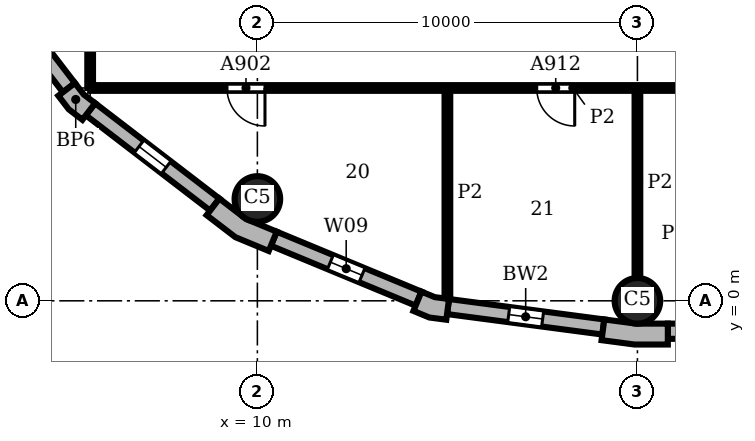
"""IFC4 building model, lengths in metres.
Left out: names, types, materials, properties, quantities, classifications, styles, units other than length and angle.
Written with IfcOpenShell. Run it as: python <this file> out.ifc"""

import sys

from ifc_helpers import new_model, si_unit, direction, frame, frame_2d, origin, origin_2d, place, context, subcontext, project, spatial, polyline, rectangle, circle, outline, extrude, element, fill, save


model = new_model("IFC4")
c1 = context("Model", 3, precision=1e-05, world=origin(), true_north=direction((0.0, 1.0)))
c2 = subcontext(c1, "Body", "Model", "MODEL_VIEW")
j1 = project(units=[si_unit("LENGTHUNIT", "METRE"), si_unit("PLANEANGLEUNIT", "RADIAN")], contexts=[c1])
p1 = place(None, origin())
s1 = spatial("IfcSite", under=j1, at=p1, CompositionType="ELEMENT")
p2 = place(p1, origin())
s2 = spatial("IfcBuilding", under=s1, at=p2, CompositionType="ELEMENT")
p3 = place(p2, frame((0.0, 0.0, 113.4)))
s3 = spatial("IfcBuildingStorey", under=s2, at=p3, CompositionType="ELEMENT", Elevation=113.4)
for number, where, z_axis, x_axis in (
    (1, (20.0, 0.0, 0.0), (0.0, 0.0, 1.0), (1.0, 0.0, 0.0)),
    (2, (10.0, 2.679, 0.0), (0.0, 0.0, 1.0), (1.0, 0.0, 0.0)),
):
    element("IfcColumn", number, at=place(p3, frame(where, z_axis=z_axis, x_axis=x_axis)), inside=s3, PredefinedType="COLUMN", context=c2, shape_type="SweptSolid", body=[
        extrude(circle(Radius=0.6, at=origin_2d()), origin(), (0.0, 0.0, 1.0), 3.9),
    ])
p4 = place(p3, origin())
e3 = element("IfcWall", 3, at=p4, inside=s3, PredefinedType="SOLIDWALL", context=c2, shape_type="SweptSolid", body=[
    extrude(outline(polyline([(19.076, -0.887), (19.057, -1.036), (19.925, -1.15), (20.8, -1.15), (20.8, -1.0), (20.8, -0.6), (19.961, -0.6), (19.128, -0.49), (19.076, -0.887)])), origin(), (0.0, 0.0, 1.0), 3.9),
])
e4 = element("IfcWall", 4, at=p4, inside=s3, PredefinedType="SOLIDWALL", context=c2, shape_type="SweptSolid", body=[
    extrude(outline(polyline([(4.882, 5.487), (4.763, 5.396), (5.038, 5.038), (5.396, 4.763), (5.487, 4.882), (5.731, 5.199), (5.43, 5.43), (5.199, 5.731), (4.882, 5.487)])), origin(), (0.0, 0.0, 1.0), 3.9),
])
e5 = element("IfcWall", 5, at=p4, inside=s3, PredefinedType="SOLIDWALL", context=c2, shape_type="SweptSolid", body=[
    extrude(outline(polyline([(8.757, 2.373), (8.665, 2.254), (9.42, 1.675), (10.299, 1.311), (10.356, 1.449), (10.51, 1.819), (9.698, 2.155), (9.0, 2.69), (8.757, 2.373)])), origin(), (0.0, 0.0, 1.0), 3.9),
])
e6 = element("IfcWall", 6, at=p4, inside=s3, PredefinedType="SOLIDWALL", context=c2, shape_type="SweptSolid", body=[
    extrude(outline(polyline([(14.164, -0.128), (14.106, -0.266), (14.523, -0.439), (14.971, -0.498), (14.99, -0.349), (15.043, 0.047), (14.667, 0.097), (14.317, 0.242), (14.164, -0.128)])), origin(), (0.0, 0.0, 1.0), 3.9),
])
p5 = place(p3, frame((20.8, -0.8, 0.0), z_axis=(0.0, 0.0, 1.0), x_axis=(1.0, 0.0, 0.0)))
e7 = element("IfcWall", 7, at=p5, inside=s3, PredefinedType="SOLIDWALL", context=c2, shape_type="SweptSolid", body=[
    extrude(rectangle(XDim=48.4, YDim=0.4, at=frame_2d((24.2, 0.0))), origin(), (0.0, 0.0, 1.0), 3.9),
])
p6 = place(p5, frame((3.75, 0.0, 0.9)))
e8 = element("IfcOpeningElement", 8, at=p6, cuts=e7, PredefinedType="OPENING", context=c2, shape_type="SweptSolid", body=[
    extrude(rectangle(XDim=0.9, YDim=2.35, at=frame_2d((0.45, 1.175))), frame((0.0, 0.21, 0.0), z_axis=(0.0, -1.0, 0.0), x_axis=(1.0, 0.0, 0.0)), (0.0, 0.0, 1.0), 0.42),
])
p7 = place(p5, frame((13.75, 0.0, 0.9)))
e9 = element("IfcOpeningElement", 9, at=p7, cuts=e7, PredefinedType="OPENING", context=c2, shape_type="SweptSolid", body=[
    extrude(rectangle(XDim=0.9, YDim=2.35, at=frame_2d((0.45, 1.175))), frame((0.0, 0.21, 0.0), z_axis=(0.0, -1.0, 0.0), x_axis=(1.0, 0.0, 0.0)), (0.0, 0.0, 1.0), 0.42),
])
p8 = place(p5, frame((23.75, 0.0, 0.9)))
e10 = element("IfcOpeningElement", 10, at=p8, cuts=e7, PredefinedType="OPENING", context=c2, shape_type="SweptSolid", body=[
    extrude(rectangle(XDim=0.9, YDim=2.35, at=frame_2d((0.45, 1.175))), frame((0.0, 0.21, 0.0), z_axis=(0.0, -1.0, 0.0), x_axis=(1.0, 0.0, 0.0)), (0.0, 0.0, 1.0), 0.42),
])
p9 = place(p5, frame((33.75, 0.0, 0.9)))
e11 = element("IfcOpeningElement", 11, at=p9, cuts=e7, PredefinedType="OPENING", context=c2, shape_type="SweptSolid", body=[
    extrude(rectangle(XDim=0.9, YDim=2.35, at=frame_2d((0.45, 1.175))), frame((0.0, 0.21, 0.0), z_axis=(0.0, -1.0, 0.0), x_axis=(1.0, 0.0, 0.0)), (0.0, 0.0, 1.0), 0.42),
])
p10 = place(p5, frame((43.75, 0.0, 0.9)))
e12 = element("IfcOpeningElement", 12, at=p10, cuts=e7, PredefinedType="OPENING", context=c2, shape_type="SweptSolid", body=[
    extrude(rectangle(XDim=0.9, YDim=2.35, at=frame_2d((0.45, 1.175))), frame((0.0, 0.21, 0.0), z_axis=(0.0, -1.0, 0.0), x_axis=(1.0, 0.0, 0.0)), (0.0, 0.0, 1.0), 0.42),
])
p11 = place(p3, frame((2.532, 8.878, 0.0), z_axis=(0.0, 0.0, 1.0), x_axis=(0.608759824817, -0.793354571229, 0.0)))
e13 = element("IfcWall", 13, at=p11, inside=s3, PredefinedType="SOLIDWALL", context=c2, shape_type="SweptSolid", body=[
    extrude(rectangle(XDim=4.121, YDim=0.4, at=frame_2d((2.061, 0.0))), origin(), (0.0, 0.0, 1.0), 3.9),
])
p12 = place(p11, frame((1.611, 0.0, 0.9)))
e14 = element("IfcOpeningElement", 14, at=p12, cuts=e13, PredefinedType="OPENING", context=c2, shape_type="SweptSolid", body=[
    extrude(rectangle(XDim=0.9, YDim=2.35, at=frame_2d((0.45, 1.175))), frame((0.0, 0.21, 0.0), z_axis=(0.0, -1.0, 0.0), x_axis=(1.0, 0.0, 0.0)), (0.0, 0.0, 1.0), 0.42),
])
p13 = place(p3, frame((5.609, 5.041, 0.0), z_axis=(0.0, 0.0, 1.0), x_axis=(0.793354571229, -0.608759824817, 0.0)))
e15 = element("IfcWall", 15, at=p13, inside=s3, PredefinedType="SOLIDWALL", context=c2, shape_type="SweptSolid", body=[
    extrude(rectangle(XDim=4.121, YDim=0.4, at=frame_2d((2.061, 0.0))), origin(), (0.0, 0.0, 1.0), 3.9),
])
p14 = place(p13, frame((1.611, 0.0, 0.9)))
e16 = element("IfcOpeningElement", 16, at=p14, cuts=e15, PredefinedType="OPENING", context=c2, shape_type="SweptSolid", body=[
    extrude(rectangle(XDim=0.9, YDim=2.35, at=frame_2d((0.45, 1.175))), frame((0.0, 0.21, 0.0), z_axis=(0.0, -1.0, 0.0), x_axis=(1.0, 0.0, 0.0)), (0.0, 0.0, 1.0), 0.42),
])
p15 = place(p3, frame((10.433, 1.634, 0.0), z_axis=(0.0, 0.0, 1.0), x_axis=(0.923863744394, -0.382721546029, 0.0)))
e17 = element("IfcWall", 17, at=p15, inside=s3, PredefinedType="SOLIDWALL", context=c2, shape_type="SweptSolid", body=[
    extrude(rectangle(XDim=4.121, YDim=0.4, at=frame_2d((2.061, 0.0))), origin(), (0.0, 0.0, 1.0), 3.9),
])
p16 = place(p15, frame((1.611, 0.0, 0.9)))
e18 = element("IfcOpeningElement", 18, at=p16, cuts=e17, PredefinedType="OPENING", context=c2, shape_type="SweptSolid", body=[
    extrude(rectangle(XDim=0.9, YDim=2.35, at=frame_2d((0.45, 1.175))), frame((0.0, 0.21, 0.0), z_axis=(0.0, -1.0, 0.0), x_axis=(1.0, 0.0, 0.0)), (0.0, 0.0, 1.0), 0.42),
])
p17 = place(p3, frame((15.017, -0.151, 0.0), z_axis=(0.0, 0.0, 1.0), x_axis=(0.991446429508, -0.130514280502, 0.0)))
e19 = element("IfcWall", 19, at=p17, inside=s3, PredefinedType="SOLIDWALL", context=c2, shape_type="SweptSolid", body=[
    extrude(rectangle(XDim=4.121, YDim=0.4, at=frame_2d((2.061, 0.0))), origin(), (0.0, 0.0, 1.0), 3.9),
])
p18 = place(p17, frame((1.611, 0.0, 0.9)))
e20 = element("IfcOpeningElement", 20, at=p18, cuts=e19, PredefinedType="OPENING", context=c2, shape_type="SweptSolid", body=[
    extrude(rectangle(XDim=0.9, YDim=2.35, at=frame_2d((0.45, 1.175))), frame((0.0, 0.21, 0.0), z_axis=(0.0, -1.0, 0.0), x_axis=(1.0, 0.0, 0.0)), (0.0, 0.0, 1.0), 0.42),
])
p19 = place(p3, frame((5.6, 5.6, 0.0), z_axis=(0.0, 0.0, 1.0), x_axis=(0.0, 1.0, 0.0)))
e21 = element("IfcWall", 21, at=p19, inside=s3, PredefinedType="PARTITIONING", context=c2, shape_type="SweptSolid", body=[
    extrude(rectangle(XDim=54.4, YDim=0.15, at=frame_2d((27.2, 0.0))), origin(), (0.0, 0.0, 1.0), 3.45),
])
p20 = place(p19, frame((35.8, 0.0, 0.0)))
e22 = element("IfcOpeningElement", 22, at=p20, cuts=e21, PredefinedType="OPENING", context=c2, shape_type="SweptSolid", body=[
    extrude(rectangle(XDim=1.8, YDim=2.1, at=frame_2d((0.9, 1.05))), frame((0.0, 0.085, 0.0), z_axis=(0.0, -1.0, 0.0), x_axis=(1.0, 0.0, 0.0)), (0.0, 0.0, 1.0), 0.17),
])
p21 = place(p3, frame((15.0, 0.063, 0.0), z_axis=(0.0, 0.0, 1.0), x_axis=(0.0, 1.0, 0.0)))
e23 = element("IfcWall", 23, at=p21, inside=s3, PredefinedType="PARTITIONING", context=c2, shape_type="SweptSolid", body=[
    extrude(rectangle(XDim=5.537, YDim=0.15, at=frame_2d((2.769, 0.0))), origin(), (0.0, 0.0, 1.0), 3.45),
])
p22 = place(p3, frame((20.0, 0.6, 0.0), z_axis=(0.0, 0.0, 1.0), x_axis=(0.0, 1.0, 0.0)))
e24 = element("IfcWall", 24, at=p22, inside=s3, PredefinedType="PARTITIONING", context=c2, shape_type="SweptSolid", body=[
    extrude(rectangle(XDim=5.0, YDim=0.15, at=frame_2d((2.5, 0.0))), origin(), (0.0, 0.0, 1.0), 3.45),
])
p23 = place(p3, frame((5.6, 5.6, 0.0), z_axis=(0.0, 0.0, 1.0), x_axis=(1.0, 0.0, 0.0)))
e25 = element("IfcWall", 25, at=p23, inside=s3, PredefinedType="PARTITIONING", context=c2, shape_type="SweptSolid", body=[
    extrude(rectangle(XDim=25.4, YDim=0.15, at=frame_2d((12.7, 0.0))), origin(), (0.0, 0.0, 1.0), 3.45),
])
p24 = place(p23, frame((3.6, 0.0, 0.0)))
e26 = element("IfcOpeningElement", 26, at=p24, cuts=e25, PredefinedType="OPENING", context=c2, shape_type="SweptSolid", body=[
    extrude(rectangle(XDim=1.0, YDim=2.1, at=frame_2d((0.5, 1.05))), frame((0.0, 0.085, 0.0), z_axis=(0.0, -1.0, 0.0), x_axis=(1.0, 0.0, 0.0)), (0.0, 0.0, 1.0), 0.17),
])
p25 = place(p23, frame((11.75, 0.0, 0.0)))
e27 = element("IfcOpeningElement", 27, at=p25, cuts=e25, PredefinedType="OPENING", context=c2, shape_type="SweptSolid", body=[
    extrude(rectangle(XDim=1.0, YDim=2.1, at=frame_2d((0.5, 1.05))), frame((0.0, 0.085, 0.0), z_axis=(0.0, -1.0, 0.0), x_axis=(1.0, 0.0, 0.0)), (0.0, 0.0, 1.0), 0.17),
])
p26 = place(p23, frame((20.0, 0.0, 0.0)))
e28 = element("IfcOpeningElement", 28, at=p26, cuts=e25, PredefinedType="OPENING", context=c2, shape_type="SweptSolid", body=[
    extrude(rectangle(XDim=1.0, YDim=2.1, at=frame_2d((0.5, 1.05))), frame((0.0, 0.085, 0.0), z_axis=(0.0, -1.0, 0.0), x_axis=(1.0, 0.0, 0.0)), (0.0, 0.0, 1.0), 0.17),
])
p27 = place(p14, origin())
e29 = element("IfcWindow", 29, at=p27, inside=s3, PartitioningType="SINGLE_PANEL", PredefinedType="WINDOW", context=c2, shape_type="SweptSolid", body=[
    extrude(rectangle(XDim=0.9, YDim=2.35, at=frame_2d((0.45, 1.175))), frame((0.0, 0.16, 0.0), z_axis=(0.0, -1.0, 0.0), x_axis=(1.0, 0.0, 0.0)), (0.0, 0.0, 1.0), 0.06),
])
fill(e16, e29)
p28 = place(p16, origin())
e30 = element("IfcWindow", 30, at=p28, inside=s3, PartitioningType="SINGLE_PANEL", PredefinedType="WINDOW", context=c2, shape_type="SweptSolid", body=[
    extrude(rectangle(XDim=0.9, YDim=2.35, at=frame_2d((0.45, 1.175))), frame((0.0, 0.16, 0.0), z_axis=(0.0, -1.0, 0.0), x_axis=(1.0, 0.0, 0.0)), (0.0, 0.0, 1.0), 0.06),
])
fill(e18, e30)
p29 = place(p18, origin())
e31 = element("IfcWindow", 31, at=p29, inside=s3, PartitioningType="SINGLE_PANEL", PredefinedType="WINDOW", context=c2, shape_type="SweptSolid", body=[
    extrude(rectangle(XDim=0.9, YDim=2.35, at=frame_2d((0.45, 1.175))), frame((0.0, 0.16, 0.0), z_axis=(0.0, -1.0, 0.0), x_axis=(1.0, 0.0, 0.0)), (0.0, 0.0, 1.0), 0.06),
])
fill(e20, e31)
p30 = place(p24, frame((1.0, 0.0, 0.0), z_axis=(0.0, 0.0, 1.0), x_axis=(-1.0, 0.0, 0.0)))
e32 = element("IfcDoor", 32, at=p30, inside=s3, OperationType="SINGLE_SWING_LEFT", PredefinedType="DOOR", context=c2, shape_type="SweptSolid", body=[
    extrude(rectangle(XDim=1.0, YDim=2.1, at=frame_2d((0.5, 1.05))), frame((0.0, 0.025, 0.0), z_axis=(0.0, -1.0, 0.0), x_axis=(1.0, 0.0, 0.0)), (0.0, 0.0, 1.0), 0.05),
])
fill(e26, e32)
p31 = place(p25, frame((1.0, 0.0, 0.0), z_axis=(0.0, 0.0, 1.0), x_axis=(-1.0, 0.0, 0.0)))
e33 = element("IfcDoor", 33, at=p31, inside=s3, OperationType="SINGLE_SWING_LEFT", PredefinedType="DOOR", context=c2, shape_type="SweptSolid", body=[
    extrude(rectangle(XDim=1.0, YDim=2.1, at=frame_2d((0.5, 1.05))), frame((0.0, 0.025, 0.0), z_axis=(0.0, -1.0, 0.0), x_axis=(1.0, 0.0, 0.0)), (0.0, 0.0, 1.0), 0.05),
])
fill(e27, e33)
save(model, sys.argv[1])
